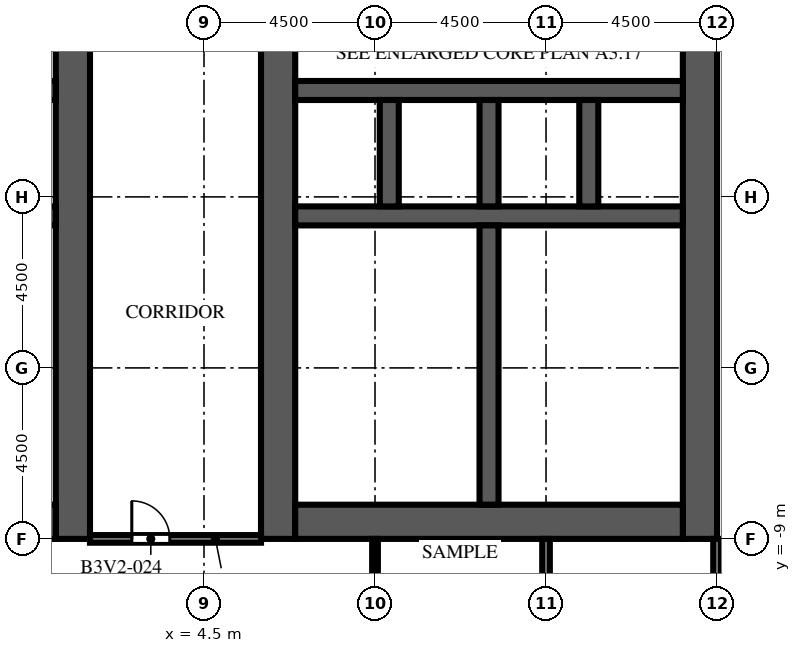
"""IFC4 building model, lengths in metres.
Left out: names, types, materials, properties, quantities, classifications, styles, units other than length and angle.
Written with IfcOpenShell. Run it as: python <this file> out.ifc"""

import sys

from ifc_helpers import new_model, si_unit, direction, frame, frame_2d, origin, place, context, subcontext, project, spatial, rectangle, extrude, element, fill, save


model = new_model("IFC4")
c1 = context("Model", 3, precision=1e-05, world=origin(), true_north=direction((0.0, 1.0)))
c2 = subcontext(c1, "Body", "Model", "MODEL_VIEW")
j1 = project(units=[si_unit("LENGTHUNIT", "METRE"), si_unit("PLANEANGLEUNIT", "RADIAN")], contexts=[c1])
p1 = place(None, origin())
s1 = spatial("IfcSite", under=j1, at=p1, CompositionType="ELEMENT")
p2 = place(p1, origin())
s2 = spatial("IfcBuilding", under=s1, at=p2, CompositionType="ELEMENT")
p3 = place(p2, frame((0.0, 0.0, 106.6)))
s3 = spatial("IfcBuildingStorey", under=s2, at=p3, CompositionType="ELEMENT", Elevation=106.6)
p4 = place(p3, frame((1.05, -9.0, 0.0), z_axis=(0.0, 0.0, 1.0), x_axis=(0.0, 1.0, 0.0)))
e1 = element("IfcWall", 1, at=p4, inside=s3, PredefinedType="SHEAR", context=c2, shape_type="SweptSolid", body=[
    extrude(rectangle(XDim=27.5, YDim=0.9, at=frame_2d((13.75, 0.0))), origin(), (0.0, 0.0, 1.0), 4.1),
])
p5 = place(p4, frame((12.55, 0.0, 0.0)))
e2 = element("IfcOpeningElement", 2, at=p5, cuts=e1, PredefinedType="OPENING", context=c2, shape_type="SweptSolid", body=[
    extrude(rectangle(XDim=2.4, YDim=2.4, at=frame_2d((1.2, 1.2))), frame((0.0, 0.46, 0.0), z_axis=(0.0, -1.0, 0.0), x_axis=(1.0, 0.0, 0.0)), (0.0, 0.0, 1.0), 0.92),
])
p6 = place(p4, frame((3.893, 0.0, 0.0)))
e3 = element("IfcOpeningElement", 3, at=p6, cuts=e1, PredefinedType="OPENING", context=c2, shape_type="SweptSolid", body=[
    extrude(rectangle(XDim=0.923, YDim=2.1, at=frame_2d((0.461, 1.05))), frame((0.0, 0.46, 0.0), z_axis=(0.0, -1.0, 0.0), x_axis=(1.0, 0.0, 0.0)), (0.0, 0.0, 1.0), 0.92),
])
p7 = place(p4, frame((23.427, 0.0, 0.0)))
e4 = element("IfcOpeningElement", 4, at=p7, cuts=e1, PredefinedType="OPENING", context=c2, shape_type="SweptSolid", body=[
    extrude(rectangle(XDim=1.2, YDim=2.1, at=frame_2d((0.6, 1.05))), frame((0.0, 0.46, 0.0), z_axis=(0.0, -1.0, 0.0), x_axis=(1.0, 0.0, 0.0)), (0.0, 0.0, 1.0), 0.92),
])
p8 = place(p3, frame((-9.6, -8.55, 0.0), z_axis=(0.0, 0.0, 1.0), x_axis=(1.0, 0.0, 0.0)))
e5 = element("IfcWall", 5, at=p8, inside=s3, PredefinedType="SHEAR", context=c2, shape_type="SweptSolid", body=[
    extrude(rectangle(XDim=10.2, YDim=0.9, at=frame_2d((5.1, 0.0))), origin(), (0.0, 0.0, 1.0), 4.1),
])
p9 = place(p3, frame((-9.6, -0.5, 0.0), z_axis=(0.0, 0.0, 1.0), x_axis=(1.0, 0.0, 0.0)))
e6 = element("IfcWall", 6, at=p9, inside=s3, PredefinedType="SHEAR", context=c2, shape_type="SweptSolid", body=[
    extrude(rectangle(XDim=10.2, YDim=0.5, at=frame_2d((5.1, 0.0))), origin(), (0.0, 0.0, 1.0), 4.1),
])
p10 = place(p3, frame((-9.6, 2.8, 0.0), z_axis=(0.0, 0.0, 1.0), x_axis=(1.0, 0.0, 0.0)))
e7 = element("IfcWall", 7, at=p10, inside=s3, PredefinedType="SHEAR", context=c2, shape_type="SweptSolid", body=[
    extrude(rectangle(XDim=10.2, YDim=0.5, at=frame_2d((5.1, 0.0))), origin(), (0.0, 0.0, 1.0), 4.1),
])
p11 = place(p10, frame((0.562, 0.0, 0.0)))
e8 = element("IfcOpeningElement", 8, at=p11, cuts=e7, PredefinedType="OPENING", context=c2, shape_type="SweptSolid", body=[
    extrude(rectangle(XDim=1.1, YDim=2.1, at=frame_2d((0.55, 1.05))), frame((0.0, 0.26, 0.0), z_axis=(0.0, -1.0, 0.0), x_axis=(1.0, 0.0, 0.0)), (0.0, 0.0, 1.0), 0.52),
])
p12 = place(p10, frame((3.238, 0.0, 0.0)))
e9 = element("IfcOpeningElement", 9, at=p12, cuts=e7, PredefinedType="OPENING", context=c2, shape_type="SweptSolid", body=[
    extrude(rectangle(XDim=1.1, YDim=2.1, at=frame_2d((0.55, 1.05))), frame((0.0, 0.26, 0.0), z_axis=(0.0, -1.0, 0.0), x_axis=(1.0, 0.0, 0.0)), (0.0, 0.0, 1.0), 0.52),
])
p13 = place(p10, frame((8.538, 0.0, 0.0)))
e10 = element("IfcOpeningElement", 10, at=p13, cuts=e7, PredefinedType="OPENING", context=c2, shape_type="SweptSolid", body=[
    extrude(rectangle(XDim=1.1, YDim=2.1, at=frame_2d((0.55, 1.05))), frame((0.0, 0.26, 0.0), z_axis=(0.0, -1.0, 0.0), x_axis=(1.0, 0.0, 0.0)), (0.0, 0.0, 1.0), 0.52),
])
p14 = place(p3, frame((6.45, -9.0, 0.0), z_axis=(0.0, 0.0, 1.0), x_axis=(0.0, 1.0, 0.0)))
e11 = element("IfcWall", 11, at=p14, inside=s3, PredefinedType="SHEAR", context=c2, shape_type="SweptSolid", body=[
    extrude(rectangle(XDim=27.5, YDim=0.9, at=frame_2d((13.75, 0.0))), origin(), (0.0, 0.0, 1.0), 4.1),
])
p15 = place(p14, frame((12.55, 0.0, 0.0)))
e12 = element("IfcOpeningElement", 12, at=p15, cuts=e11, PredefinedType="OPENING", context=c2, shape_type="SweptSolid", body=[
    extrude(rectangle(XDim=2.4, YDim=2.4, at=frame_2d((1.2, 1.2))), frame((0.0, 0.46, 0.0), z_axis=(0.0, -1.0, 0.0), x_axis=(1.0, 0.0, 0.0)), (0.0, 0.0, 1.0), 0.92),
])
p16 = place(p14, frame((3.893, 0.0, 0.0)))
e13 = element("IfcOpeningElement", 13, at=p16, cuts=e11, PredefinedType="OPENING", context=c2, shape_type="SweptSolid", body=[
    extrude(rectangle(XDim=0.923, YDim=2.1, at=frame_2d((0.461, 1.05))), frame((0.0, 0.46, 0.0), z_axis=(0.0, -1.0, 0.0), x_axis=(1.0, 0.0, 0.0)), (0.0, 0.0, 1.0), 0.92),
])
p17 = place(p14, frame((23.427, 0.0, 0.0)))
e14 = element("IfcOpeningElement", 14, at=p17, cuts=e11, PredefinedType="OPENING", context=c2, shape_type="SweptSolid", body=[
    extrude(rectangle(XDim=1.2, YDim=2.1, at=frame_2d((0.6, 1.05))), frame((0.0, 0.46, 0.0), z_axis=(0.0, -1.0, 0.0), x_axis=(1.0, 0.0, 0.0)), (0.0, 0.0, 1.0), 0.92),
])
p18 = place(p3, frame((17.55, -9.0, 0.0), z_axis=(0.0, 0.0, 1.0), x_axis=(0.0, 1.0, 0.0)))
e15 = element("IfcWall", 15, at=p18, inside=s3, PredefinedType="SHEAR", context=c2, shape_type="SweptSolid", body=[
    extrude(rectangle(XDim=27.5, YDim=0.9, at=frame_2d((13.75, 0.0))), origin(), (0.0, 0.0, 1.0), 4.1),
])
p19 = place(p18, frame((12.55, 0.0, 0.0)))
e16 = element("IfcOpeningElement", 16, at=p19, cuts=e15, PredefinedType="OPENING", context=c2, shape_type="SweptSolid", body=[
    extrude(rectangle(XDim=2.4, YDim=2.4, at=frame_2d((1.2, 1.2))), frame((0.0, 0.46, 0.0), z_axis=(0.0, -1.0, 0.0), x_axis=(1.0, 0.0, 0.0)), (0.0, 0.0, 1.0), 0.92),
])
p20 = place(p18, frame((6.825, 0.0, 0.0)))
e17 = element("IfcOpeningElement", 17, at=p20, cuts=e15, PredefinedType="OPENING", context=c2, shape_type="SweptSolid", body=[
    extrude(rectangle(XDim=1.2, YDim=2.1, at=frame_2d((0.6, 1.05))), frame((0.0, 0.46, 0.0), z_axis=(0.0, -1.0, 0.0), x_axis=(1.0, 0.0, 0.0)), (0.0, 0.0, 1.0), 0.92),
])
p21 = place(p18, frame((19.475, 0.0, 0.0)))
e18 = element("IfcOpeningElement", 18, at=p21, cuts=e15, PredefinedType="OPENING", context=c2, shape_type="SweptSolid", body=[
    extrude(rectangle(XDim=1.2, YDim=2.1, at=frame_2d((0.6, 1.05))), frame((0.0, 0.46, 0.0), z_axis=(0.0, -1.0, 0.0), x_axis=(1.0, 0.0, 0.0)), (0.0, 0.0, 1.0), 0.92),
])
p22 = place(p3, frame((6.9, -8.55, 0.0), z_axis=(0.0, 0.0, 1.0), x_axis=(1.0, 0.0, 0.0)))
e19 = element("IfcWall", 19, at=p22, inside=s3, PredefinedType="SHEAR", context=c2, shape_type="SweptSolid", body=[
    extrude(rectangle(XDim=10.2, YDim=0.9, at=frame_2d((5.1, 0.0))), origin(), (0.0, 0.0, 1.0), 4.1),
])
p23 = place(p3, frame((6.9, -0.5, 0.0), z_axis=(0.0, 0.0, 1.0), x_axis=(1.0, 0.0, 0.0)))
e20 = element("IfcWall", 20, at=p23, inside=s3, PredefinedType="SHEAR", context=c2, shape_type="SweptSolid", body=[
    extrude(rectangle(XDim=10.2, YDim=0.5, at=frame_2d((5.1, 0.0))), origin(), (0.0, 0.0, 1.0), 4.1),
])
p24 = place(p3, frame((6.9, 2.8, 0.0), z_axis=(0.0, 0.0, 1.0), x_axis=(1.0, 0.0, 0.0)))
e21 = element("IfcWall", 21, at=p24, inside=s3, PredefinedType="SHEAR", context=c2, shape_type="SweptSolid", body=[
    extrude(rectangle(XDim=10.2, YDim=0.5, at=frame_2d((5.1, 0.0))), origin(), (0.0, 0.0, 1.0), 4.1),
])
p25 = place(p24, frame((0.562, 0.0, 0.0)))
e22 = element("IfcOpeningElement", 22, at=p25, cuts=e21, PredefinedType="OPENING", context=c2, shape_type="SweptSolid", body=[
    extrude(rectangle(XDim=1.1, YDim=2.1, at=frame_2d((0.55, 1.05))), frame((0.0, 0.26, 0.0), z_axis=(0.0, -1.0, 0.0), x_axis=(1.0, 0.0, 0.0)), (0.0, 0.0, 1.0), 0.52),
])
p26 = place(p24, frame((3.238, 0.0, 0.0)))
e23 = element("IfcOpeningElement", 23, at=p26, cuts=e21, PredefinedType="OPENING", context=c2, shape_type="SweptSolid", body=[
    extrude(rectangle(XDim=1.1, YDim=2.1, at=frame_2d((0.55, 1.05))), frame((0.0, 0.26, 0.0), z_axis=(0.0, -1.0, 0.0), x_axis=(1.0, 0.0, 0.0)), (0.0, 0.0, 1.0), 0.52),
])
p27 = place(p24, frame((8.538, 0.0, 0.0)))
e24 = element("IfcOpeningElement", 24, at=p27, cuts=e21, PredefinedType="OPENING", context=c2, shape_type="SweptSolid", body=[
    extrude(rectangle(XDim=1.1, YDim=2.1, at=frame_2d((0.55, 1.05))), frame((0.0, 0.26, 0.0), z_axis=(0.0, -1.0, 0.0), x_axis=(1.0, 0.0, 0.0)), (0.0, 0.0, 1.0), 0.52),
])
for number, where, z_axis, x_axis in (
    (25, (9.375, -0.25, 0.0), (0.0, 0.0, 1.0), (0.0, 1.0, 0.0)),
    (26, (12.0, -0.25, 0.0), (0.0, 0.0, 1.0), (0.0, 1.0, 0.0)),
    (27, (14.625, -0.25, 0.0), (0.0, 0.0, 1.0), (0.0, 1.0, 0.0)),
):
    element("IfcWall", number, at=place(p3, frame(where, z_axis=z_axis, x_axis=x_axis)), inside=s3, PredefinedType="SHEAR", context=c2, shape_type="SweptSolid", body=[
        extrude(rectangle(XDim=2.8, YDim=0.5, at=frame_2d((1.4, 0.0))), origin(), (0.0, 0.0, 1.0), 4.1),
    ])
p28 = place(p3, frame((12.0, -8.1, 0.0), z_axis=(0.0, 0.0, 1.0), x_axis=(0.0, 1.0, 0.0)))
e28 = element("IfcWall", 28, at=p28, inside=s3, PredefinedType="SHEAR", context=c2, shape_type="SweptSolid", body=[
    extrude(rectangle(XDim=7.35, YDim=0.5, at=frame_2d((3.675, 0.0))), origin(), (0.0, 0.0, 1.0), 4.1),
])
p29 = place(p3, frame((-4.25, -5.307, 0.0), z_axis=(0.0, 0.0, 1.0), x_axis=(1.0, 0.0, 0.0)))
e29 = element("IfcWall", 29, at=p29, inside=s3, PredefinedType="PARTITIONING", context=c2, shape_type="SweptSolid", body=[
    extrude(rectangle(XDim=4.85, YDim=0.1, at=frame_2d((2.425, 0.0))), origin(), (0.0, 0.0, 1.0), 3.5),
])
p30 = place(p29, frame((1.925, 0.0, 0.0)))
e30 = element("IfcOpeningElement", 30, at=p30, cuts=e29, PredefinedType="OPENING", context=c2, shape_type="SweptSolid", body=[
    extrude(rectangle(XDim=1.0, YDim=2.1, at=frame_2d((0.5, 1.05))), frame((0.0, 0.06, 0.0), z_axis=(0.0, -1.0, 0.0), x_axis=(1.0, 0.0, 0.0)), (0.0, 0.0, 1.0), 0.12),
])
p31 = place(p3, frame((-2.407, -3.984, 0.0), z_axis=(0.0, 0.0, 1.0), x_axis=(1.0, 0.0, 0.0)))
e31 = element("IfcWall", 31, at=p31, inside=s3, PredefinedType="PARTITIONING", context=c2, shape_type="SweptSolid", body=[
    extrude(rectangle(XDim=3.007, YDim=0.1, at=frame_2d((1.503, 0.0))), origin(), (0.0, 0.0, 1.0), 3.5),
])
p32 = place(p31, frame((1.003, 0.0, 0.0)))
e32 = element("IfcOpeningElement", 32, at=p32, cuts=e31, PredefinedType="OPENING", context=c2, shape_type="SweptSolid", body=[
    extrude(rectangle(XDim=1.0, YDim=2.1, at=frame_2d((0.5, 1.05))), frame((0.0, 0.06, 0.0), z_axis=(0.0, -1.0, 0.0), x_axis=(1.0, 0.0, 0.0)), (0.0, 0.0, 1.0), 0.12),
])
p33 = place(p3, frame((6.9, -5.307, 0.0), z_axis=(0.0, 0.0, 1.0), x_axis=(1.0, 0.0, 0.0)))
e33 = element("IfcWall", 33, at=p33, inside=s3, PredefinedType="PARTITIONING", context=c2, shape_type="SweptSolid", body=[
    extrude(rectangle(XDim=4.85, YDim=0.1, at=frame_2d((2.425, 0.0))), origin(), (0.0, 0.0, 1.0), 3.5),
])
p34 = place(p33, frame((1.925, 0.0, 0.0)))
e34 = element("IfcOpeningElement", 34, at=p34, cuts=e33, PredefinedType="OPENING", context=c2, shape_type="SweptSolid", body=[
    extrude(rectangle(XDim=1.0, YDim=2.1, at=frame_2d((0.5, 1.05))), frame((0.0, 0.06, 0.0), z_axis=(0.0, -1.0, 0.0), x_axis=(1.0, 0.0, 0.0)), (0.0, 0.0, 1.0), 0.12),
])
p35 = place(p3, frame((6.9, -3.984, 0.0), z_axis=(0.0, 0.0, 1.0), x_axis=(1.0, 0.0, 0.0)))
e35 = element("IfcWall", 35, at=p35, inside=s3, PredefinedType="PARTITIONING", context=c2, shape_type="SweptSolid", body=[
    extrude(rectangle(XDim=3.007, YDim=0.1, at=frame_2d((1.503, 0.0))), origin(), (0.0, 0.0, 1.0), 3.5),
])
p36 = place(p35, frame((1.003, 0.0, 0.0)))
e36 = element("IfcOpeningElement", 36, at=p36, cuts=e35, PredefinedType="OPENING", context=c2, shape_type="SweptSolid", body=[
    extrude(rectangle(XDim=1.0, YDim=2.1, at=frame_2d((0.5, 1.05))), frame((0.0, 0.06, 0.0), z_axis=(0.0, -1.0, 0.0), x_axis=(1.0, 0.0, 0.0)), (0.0, 0.0, 1.0), 0.12),
])
p37 = place(p3, frame((9.907, -3.984, 0.0), z_axis=(0.0, 0.0, 1.0), x_axis=(1.0, 0.0, 0.0)))
e37 = element("IfcWall", 37, at=p37, inside=s3, PredefinedType="PARTITIONING", context=c2, shape_type="SweptSolid", body=[
    extrude(rectangle(XDim=1.843, YDim=0.1, at=frame_2d((0.921, 0.0))), origin(), (0.0, 0.0, 1.0), 3.5),
])
p38 = place(p37, frame((0.421, 0.0, 0.0)))
e38 = element("IfcOpeningElement", 38, at=p38, cuts=e37, PredefinedType="OPENING", context=c2, shape_type="SweptSolid", body=[
    extrude(rectangle(XDim=1.0, YDim=2.1, at=frame_2d((0.5, 1.05))), frame((0.0, 0.06, 0.0), z_axis=(0.0, -1.0, 0.0), x_axis=(1.0, 0.0, 0.0)), (0.0, 0.0, 1.0), 0.12),
])
p39 = place(p3, frame((9.907, -3.984, 0.0), z_axis=(0.0, 0.0, 1.0), x_axis=(0.0, 1.0, 0.0)))
e39 = element("IfcWall", 39, at=p39, inside=s3, PredefinedType="PARTITIONING", context=c2, shape_type="SweptSolid", body=[
    extrude(rectangle(XDim=3.234, YDim=0.1, at=frame_2d((1.617, 0.0))), origin(), (0.0, 0.0, 1.0), 3.5),
])
p40 = place(p3, frame((9.0, -17.3, 0.0), z_axis=(0.0, 0.0, 1.0), x_axis=(0.0, 1.0, 0.0)))
e40 = element("IfcWall", 40, at=p40, inside=s3, PredefinedType="PARTITIONING", context=c2, shape_type="SweptSolid", body=[
    extrude(rectangle(XDim=8.3, YDim=0.15, at=frame_2d((4.15, 0.0))), origin(), (0.0, 0.0, 1.0), 3.5),
])
p41 = place(p3, frame((13.5, -21.9, 0.0), z_axis=(0.0, 0.0, 1.0), x_axis=(0.0, 1.0, 0.0)))
e41 = element("IfcWall", 41, at=p41, inside=s3, PredefinedType="PARTITIONING", context=c2, shape_type="SweptSolid", body=[
    extrude(rectangle(XDim=12.9, YDim=0.2, at=frame_2d((6.45, 0.0))), origin(), (0.0, 0.0, 1.0), 3.5),
])
p42 = place(p3, frame((18.0, -17.3, 0.0), z_axis=(0.0, 0.0, 1.0), x_axis=(0.0, 1.0, 0.0)))
e42 = element("IfcWall", 42, at=p42, inside=s3, PredefinedType="PARTITIONING", context=c2, shape_type="SweptSolid", body=[
    extrude(rectangle(XDim=8.3, YDim=0.2, at=frame_2d((4.15, 0.0))), origin(), (0.0, 0.0, 1.0), 3.5),
])
p43 = place(p42, frame((0.15, 0.0, 0.0)))
e43 = element("IfcOpeningElement", 43, at=p43, cuts=e42, PredefinedType="OPENING", context=c2, shape_type="SweptSolid", body=[
    extrude(rectangle(XDim=1.0, YDim=2.1, at=frame_2d((0.5, 1.05))), frame((0.0, 0.11, 0.0), z_axis=(0.0, -1.0, 0.0), x_axis=(1.0, 0.0, 0.0)), (0.0, 0.0, 1.0), 0.22),
])
p44 = place(p3, frame((6.0, -9.0, 0.0), z_axis=(0.0, 0.0, 1.0), x_axis=(-1.0, 0.0, 0.0)))
e44 = element("IfcWall", 44, at=p44, inside=s3, PredefinedType="PARTITIONING", context=c2, shape_type="SweptSolid", body=[
    extrude(rectangle(XDim=4.5, YDim=0.2, at=frame_2d((2.25, 0.0))), origin(), (0.0, 0.0, 1.0), 3.5),
])
p45 = place(p44, frame((2.4, 0.0, 0.0)))
e45 = element("IfcOpeningElement", 45, at=p45, cuts=e44, PredefinedType="OPENING", context=c2, shape_type="SweptSolid", body=[
    extrude(rectangle(XDim=1.0, YDim=2.1, at=frame_2d((0.5, 1.05))), frame((0.0, 0.11, 0.0), z_axis=(0.0, -1.0, 0.0), x_axis=(1.0, 0.0, 0.0)), (0.0, 0.0, 1.0), 0.22),
])
p46 = place(p25, origin())
e46 = element("IfcDoor", 46, at=p46, inside=s3, OperationType="DOUBLE_DOOR_SLIDING", PredefinedType="DOOR", context=c2, shape_type="SweptSolid", body=[
    extrude(rectangle(XDim=1.1, YDim=2.1, at=frame_2d((0.55, 1.05))), frame((0.0, 0.025, 0.0), z_axis=(0.0, -1.0, 0.0), x_axis=(1.0, 0.0, 0.0)), (0.0, 0.0, 1.0), 0.05),
])
fill(e22, e46)
p47 = place(p26, origin())
e47 = element("IfcDoor", 47, at=p47, inside=s3, OperationType="DOUBLE_DOOR_SLIDING", PredefinedType="DOOR", context=c2, shape_type="SweptSolid", body=[
    extrude(rectangle(XDim=1.1, YDim=2.1, at=frame_2d((0.55, 1.05))), frame((0.0, 0.025, 0.0), z_axis=(0.0, -1.0, 0.0), x_axis=(1.0, 0.0, 0.0)), (0.0, 0.0, 1.0), 0.05),
])
fill(e23, e47)
p48 = place(p27, origin())
e48 = element("IfcDoor", 48, at=p48, inside=s3, OperationType="DOUBLE_DOOR_SLIDING", PredefinedType="DOOR", context=c2, shape_type="SweptSolid", body=[
    extrude(rectangle(XDim=1.1, YDim=2.1, at=frame_2d((0.55, 1.05))), frame((0.0, 0.025, 0.0), z_axis=(0.0, -1.0, 0.0), x_axis=(1.0, 0.0, 0.0)), (0.0, 0.0, 1.0), 0.05),
])
fill(e24, e48)
p49 = place(p5, origin())
e49 = element("IfcDoor", 49, at=p49, inside=s3, OperationType="DOUBLE_DOOR_DOUBLE_SWING", PredefinedType="DOOR", context=c2, shape_type="SweptSolid", body=[
    extrude(rectangle(XDim=2.4, YDim=2.4, at=frame_2d((1.2, 1.2))), frame((0.0, 0.025, 0.0), z_axis=(0.0, -1.0, 0.0), x_axis=(1.0, 0.0, 0.0)), (0.0, 0.0, 1.0), 0.05),
])
fill(e2, e49)
p50 = place(p15, origin())
e50 = element("IfcDoor", 50, at=p50, inside=s3, OperationType="DOUBLE_DOOR_DOUBLE_SWING", PredefinedType="DOOR", context=c2, shape_type="SweptSolid", body=[
    extrude(rectangle(XDim=2.4, YDim=2.4, at=frame_2d((1.2, 1.2))), frame((0.0, 0.025, 0.0), z_axis=(0.0, -1.0, 0.0), x_axis=(1.0, 0.0, 0.0)), (0.0, 0.0, 1.0), 0.05),
])
fill(e12, e50)
p51 = place(p19, origin())
e51 = element("IfcDoor", 51, at=p51, inside=s3, OperationType="DOUBLE_DOOR_DOUBLE_SWING", PredefinedType="DOOR", context=c2, shape_type="SweptSolid", body=[
    extrude(rectangle(XDim=2.4, YDim=2.4, at=frame_2d((1.2, 1.2))), frame((0.0, 0.025, 0.0), z_axis=(0.0, -1.0, 0.0), x_axis=(1.0, 0.0, 0.0)), (0.0, 0.0, 1.0), 0.05),
])
fill(e16, e51)
p52 = place(p20, frame((1.2, 0.0, 0.0), z_axis=(0.0, 0.0, 1.0), x_axis=(-1.0, 0.0, 0.0)))
e52 = element("IfcDoor", 52, at=p52, inside=s3, OperationType="SINGLE_SWING_LEFT", PredefinedType="DOOR", context=c2, shape_type="SweptSolid", body=[
    extrude(rectangle(XDim=1.2, YDim=2.1, at=frame_2d((0.6, 1.05))), frame((0.0, 0.025, 0.0), z_axis=(0.0, -1.0, 0.0), x_axis=(1.0, 0.0, 0.0)), (0.0, 0.0, 1.0), 0.05),
])
fill(e17, e52)
p53 = place(p6, origin())
e53 = element("IfcDoor", 53, at=p53, inside=s3, OperationType="SINGLE_SWING_LEFT", PredefinedType="DOOR", context=c2, shape_type="SweptSolid", body=[
    extrude(rectangle(XDim=0.923, YDim=2.1, at=frame_2d((0.461, 1.05))), frame((0.0, 0.425, 0.0), z_axis=(0.0, -1.0, 0.0), x_axis=(1.0, 0.0, 0.0)), (0.0, 0.0, 1.0), 0.05),
])
fill(e3, e53)
p54 = place(p16, origin())
e54 = element("IfcDoor", 54, at=p54, inside=s3, OperationType="SINGLE_SWING_RIGHT", PredefinedType="DOOR", context=c2, shape_type="SweptSolid", body=[
    extrude(rectangle(XDim=0.923, YDim=2.1, at=frame_2d((0.461, 1.05))), frame((0.0, -0.375, 0.0), z_axis=(0.0, -1.0, 0.0), x_axis=(1.0, 0.0, 0.0)), (0.0, 0.0, 1.0), 0.05),
])
fill(e13, e54)
p55 = place(p34, origin())
e55 = element("IfcDoor", 55, at=p55, inside=s3, OperationType="SINGLE_SWING_LEFT", PredefinedType="DOOR", context=c2, shape_type="SweptSolid", body=[
    extrude(rectangle(XDim=1.0, YDim=2.1, at=frame_2d((0.5, 1.05))), frame((0.0, 0.025, 0.0), z_axis=(0.0, -1.0, 0.0), x_axis=(1.0, 0.0, 0.0)), (0.0, 0.0, 1.0), 0.05),
])
fill(e34, e55)
p56 = place(p36, origin())
e56 = element("IfcDoor", 56, at=p56, inside=s3, OperationType="SINGLE_SWING_RIGHT", PredefinedType="DOOR", context=c2, shape_type="SweptSolid", body=[
    extrude(rectangle(XDim=1.0, YDim=2.1, at=frame_2d((0.5, 1.05))), frame((0.0, 0.025, 0.0), z_axis=(0.0, -1.0, 0.0), x_axis=(1.0, 0.0, 0.0)), (0.0, 0.0, 1.0), 0.05),
])
fill(e36, e56)
p57 = place(p38, origin())
e57 = element("IfcDoor", 57, at=p57, inside=s3, OperationType="SINGLE_SWING_LEFT", PredefinedType="DOOR", context=c2, shape_type="SweptSolid", body=[
    extrude(rectangle(XDim=1.0, YDim=2.1, at=frame_2d((0.5, 1.05))), frame((0.0, 0.025, 0.0), z_axis=(0.0, -1.0, 0.0), x_axis=(1.0, 0.0, 0.0)), (0.0, 0.0, 1.0), 0.05),
])
fill(e38, e57)
p58 = place(p45, origin())
e58 = element("IfcDoor", 58, at=p58, inside=s3, OperationType="SINGLE_SWING_RIGHT", PredefinedType="DOOR", context=c2, shape_type="SweptSolid", body=[
    extrude(rectangle(XDim=1.0, YDim=2.1, at=frame_2d((0.5, 1.05))), frame((0.0, 0.025, 0.0), z_axis=(0.0, -1.0, 0.0), x_axis=(1.0, 0.0, 0.0)), (0.0, 0.0, 1.0), 0.05),
])
fill(e45, e58)
save(model, sys.argv[1])
